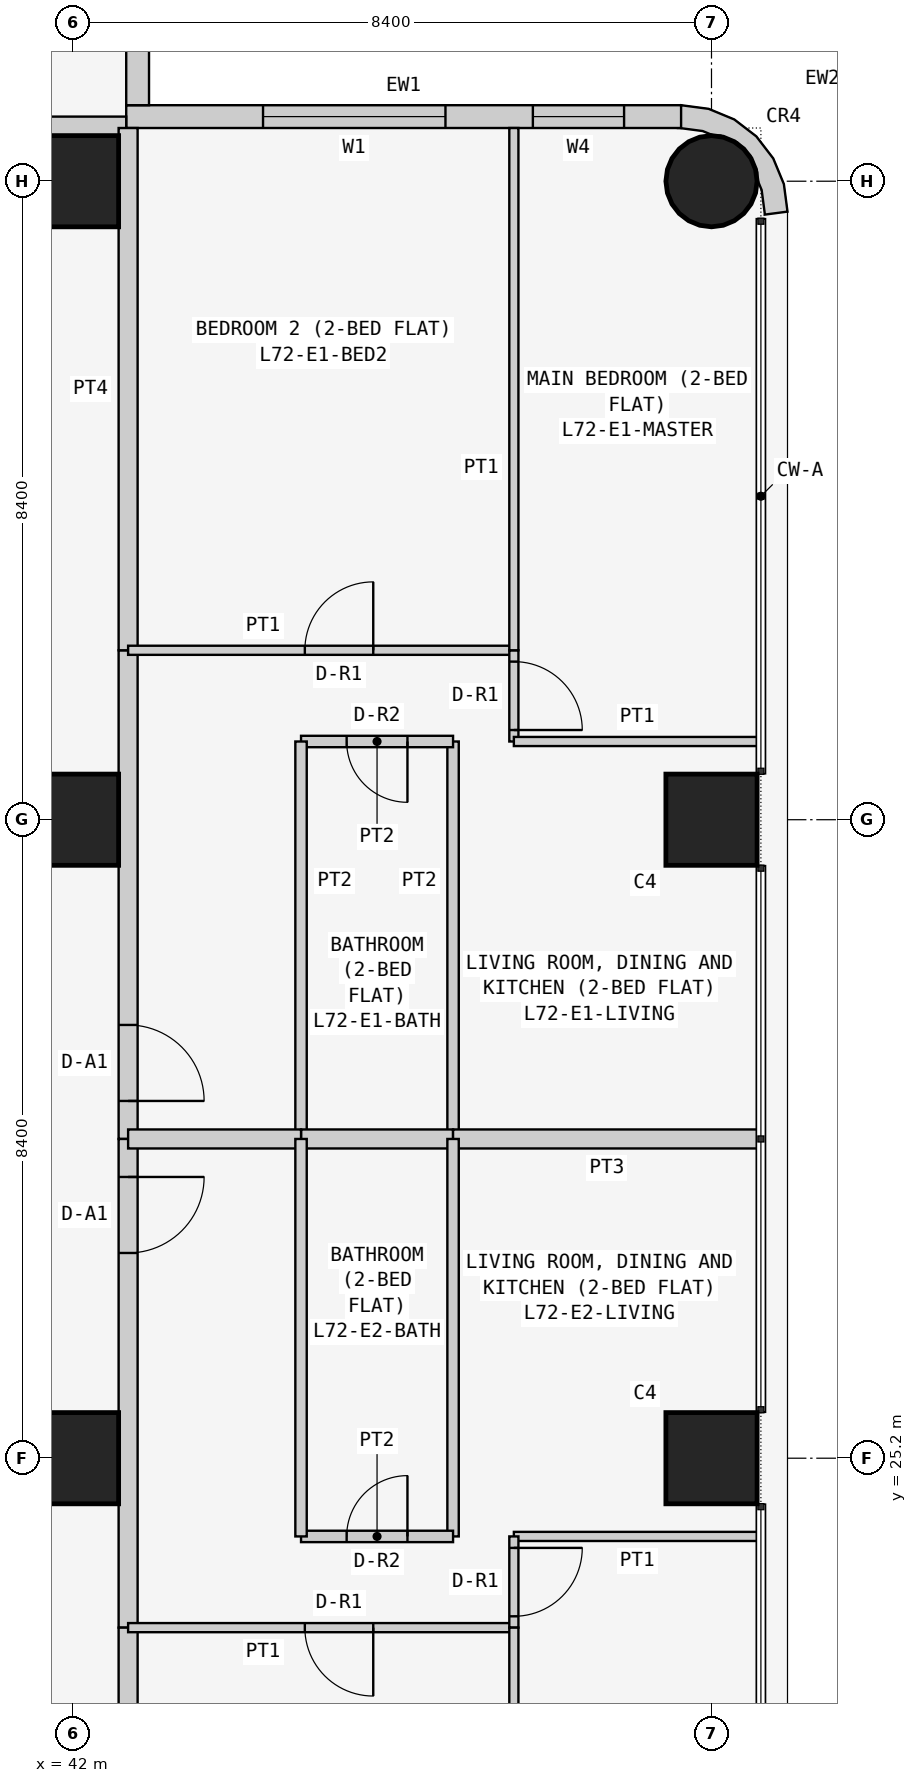
"""IFC4 building model, lengths in metres.
Left out: names, types, materials, properties, quantities, classifications, styles, units other than length and angle.
Written with IfcOpenShell. Run it as: python <this file> out.ifc"""

import sys

from ifc_helpers import new_model, si_unit, direction, frame, frame_2d, origin, origin_2d, place, context, subcontext, project, spatial, polyline, rectangle, circle, outline, extrude, element, fill, save


model = new_model("IFC4")
c1 = context("Model", 3, precision=1e-05, world=origin(), true_north=direction((0.0, 1.0)))
c2 = subcontext(c1, "Body", "Model", "MODEL_VIEW")
j1 = project(units=[si_unit("LENGTHUNIT", "METRE"), si_unit("PLANEANGLEUNIT", "RADIAN")], contexts=[c1])
p1 = place(None, origin())
s1 = spatial("IfcSite", under=j1, at=p1, CompositionType="ELEMENT")
p2 = place(p1, origin())
s2 = spatial("IfcBuilding", under=s1, at=p2, CompositionType="ELEMENT")
p3 = place(p2, frame((0.0, 0.0, 275.7)))
s3 = spatial("IfcBuildingStorey", under=s2, at=p3, CompositionType="ELEMENT", Elevation=275.7)
for number, where, z_axis, x_axis in (
    (1, (42.0, 25.2, 0.0), (0.0, 0.0, 1.0), (1.0, 0.0, 0.0)),
    (2, (42.0, 33.6, 0.0), (0.0, 0.0, 1.0), (1.0, 0.0, 0.0)),
    (3, (42.0, 42.0, 0.0), (0.0, 0.0, 1.0), (1.0, 0.0, 0.0)),
    (4, (50.4, 25.2, 0.0), (0.0, 0.0, 1.0), (1.0, 0.0, 0.0)),
    (5, (50.4, 33.6, 0.0), (0.0, 0.0, 1.0), (1.0, 0.0, 0.0)),
):
    element("IfcColumn", number, at=place(p3, frame(where, z_axis=z_axis, x_axis=x_axis)), inside=s3, PredefinedType="COLUMN", context=c2, shape_type="SweptSolid", body=[
        extrude(rectangle(XDim=1.2, YDim=1.2, at=origin_2d()), origin(), (0.0, 0.0, 1.0), 3.6),
    ])
p4 = place(p3, frame((50.4, 42.0, 0.0), z_axis=(0.0, 0.0, 1.0), x_axis=(1.0, 0.0, 0.0)))
e6 = element("IfcColumn", 6, at=p4, inside=s3, PredefinedType="COLUMN", context=c2, shape_type="SweptSolid", body=[
    extrude(circle(Radius=0.6, at=origin_2d()), origin(), (0.0, 0.0, 1.0), 3.6),
])
p5 = place(p3, frame((50.0, 42.85, 0.0), z_axis=(0.0, 0.0, 1.0), x_axis=(-1.0, 0.0, 0.0)))
e7 = element("IfcWall", 7, at=p5, inside=s3, PredefinedType="SOLIDWALL", context=c2, shape_type="SweptSolid", body=[
    extrude(rectangle(XDim=7.3, YDim=0.3, at=frame_2d((3.65, 0.0))), origin(), (0.0, 0.0, 1.0), 3.45),
])
p6 = place(p5, frame((3.1, 0.0, 0.9)))
e8 = element("IfcOpeningElement", 8, at=p6, cuts=e7, PredefinedType="OPENING", context=c2, shape_type="SweptSolid", body=[
    extrude(rectangle(XDim=2.4, YDim=1.5, at=frame_2d((1.2, 0.75))), frame((0.0, 0.16, 0.0), z_axis=(0.0, -1.0, 0.0), x_axis=(1.0, 0.0, 0.0)), (0.0, 0.0, 1.0), 0.32),
])
p7 = place(p5, frame((0.75, 0.0, 0.9)))
e9 = element("IfcOpeningElement", 9, at=p7, cuts=e7, PredefinedType="OPENING", context=c2, shape_type="SweptSolid", body=[
    extrude(rectangle(XDim=1.2, YDim=1.5, at=frame_2d((0.6, 0.75))), frame((0.0, 0.16, 0.0), z_axis=(0.0, -1.0, 0.0), x_axis=(1.0, 0.0, 0.0)), (0.0, 0.0, 1.0), 0.32),
])
p8 = place(p3, frame((42.85, 43.0, 0.0), z_axis=(0.0, 0.0, 1.0), x_axis=(0.0, 1.0, 0.0)))
e10 = element("IfcWall", 10, at=p8, inside=s3, PredefinedType="SOLIDWALL", context=c2, shape_type="SweptSolid", body=[
    extrude(rectangle(XDim=7.0, YDim=0.3, at=frame_2d((3.5, 0.0))), origin(), (0.0, 0.0, 1.0), 3.45),
])
p9 = place(p8, frame((1.5, 0.0, 0.9)))
e11 = element("IfcOpeningElement", 11, at=p9, cuts=e10, PredefinedType="OPENING", context=c2, shape_type="SweptSolid", body=[
    extrude(rectangle(XDim=2.4, YDim=1.5, at=frame_2d((1.2, 0.75))), frame((0.0, 0.16, 0.0), z_axis=(0.0, -1.0, 0.0), x_axis=(1.0, 0.0, 0.0)), (0.0, 0.0, 1.0), 0.32),
])
p10 = place(p8, frame((5.05, 0.0, 0.9)))
e12 = element("IfcOpeningElement", 12, at=p10, cuts=e10, PredefinedType="OPENING", context=c2, shape_type="SweptSolid", body=[
    extrude(rectangle(XDim=1.2, YDim=1.5, at=frame_2d((0.6, 0.75))), frame((0.0, 0.16, 0.0), z_axis=(0.0, -1.0, 0.0), x_axis=(1.0, 0.0, 0.0)), (0.0, 0.0, 1.0), 0.32),
])
p11 = place(p3, frame((50.976, 41.638, 0.0), z_axis=(0.0, 0.0, 1.0), x_axis=(0.707106781187, 0.707106781187, 0.0)))
e13 = element("IfcWall", 13, at=p11, inside=s3, PredefinedType="SOLIDWALL", context=c2, shape_type="SweptSolid", body=[
    extrude(outline(polyline([(0.233, 0.114), (0.047, -0.129), (0.033, -0.143), (0.273, -0.327), (0.495, -0.037), (0.635, 0.301), (0.683, 0.663), (0.635, 1.025), (0.495, 1.363), (0.273, 1.653), (0.033, 1.469), (0.047, 1.455), (0.233, 1.212), (0.292, 1.069), (0.358, 1.003), (0.449, 0.782), (0.449, 0.543), (0.358, 0.322), (0.292, 0.257), (0.233, 0.114)])), origin(), (0.0, 0.0, 1.0), 3.45),
])
p12 = place(p3, frame((35.829, 42.725, 0.0), z_axis=(0.0, 0.0, 1.0), x_axis=(1.0, 0.0, 0.0)))
e14 = element("IfcWall", 14, at=p12, inside=s3, PredefinedType="PARTITIONING", context=c2, shape_type="SweptSolid", body=[
    extrude(rectangle(XDim=6.871, YDim=0.25, at=frame_2d((3.436, 0.0))), origin(), (0.0, 0.0, 1.0), 3.45),
])
p13 = place(p3, frame((42.725, 35.829, 0.0), z_axis=(0.0, 0.0, 1.0), x_axis=(0.0, -1.0, 0.0)))
e15 = element("IfcWall", 15, at=p13, inside=s3, PredefinedType="PARTITIONING", context=c2, shape_type="SweptSolid", body=[
    extrude(rectangle(XDim=6.429, YDim=0.25, at=frame_2d((3.215, 0.0))), origin(), (0.0, 0.0, 1.0), 3.45),
])
p14 = place(p13, frame((4.929, 0.0, 0.0)))
e16 = element("IfcOpeningElement", 16, at=p14, cuts=e15, PredefinedType="OPENING", context=c2, shape_type="SweptSolid", body=[
    extrude(rectangle(XDim=1.0, YDim=2.1, at=frame_2d((0.5, 1.05))), frame((0.0, 0.135, 0.0), z_axis=(0.0, -1.0, 0.0), x_axis=(1.0, 0.0, 0.0)), (0.0, 0.0, 1.0), 0.27),
])
p15 = place(p3, frame((42.725, 42.7, 0.0), z_axis=(0.0, 0.0, 1.0), x_axis=(0.0, -1.0, 0.0)))
e17 = element("IfcWall", 17, at=p15, inside=s3, PredefinedType="PARTITIONING", context=c2, shape_type="SweptSolid", body=[
    extrude(rectangle(XDim=6.871, YDim=0.25, at=frame_2d((3.436, 0.0))), origin(), (0.0, 0.0, 1.0), 3.45),
])
p16 = place(p3, frame((42.725, 29.4, 0.0), z_axis=(0.0, 0.0, 1.0), x_axis=(0.0, -1.0, 0.0)))
e18 = element("IfcWall", 18, at=p16, inside=s3, PredefinedType="PARTITIONING", context=c2, shape_type="SweptSolid", body=[
    extrude(rectangle(XDim=6.429, YDim=0.25, at=frame_2d((3.214, 0.0))), origin(), (0.0, 0.0, 1.0), 3.45),
])
p17 = place(p16, frame((0.5, 0.0, 0.0)))
e19 = element("IfcOpeningElement", 19, at=p17, cuts=e18, PredefinedType="OPENING", context=c2, shape_type="SweptSolid", body=[
    extrude(rectangle(XDim=1.0, YDim=2.1, at=frame_2d((0.5, 1.05))), frame((0.0, 0.135, 0.0), z_axis=(0.0, -1.0, 0.0), x_axis=(1.0, 0.0, 0.0)), (0.0, 0.0, 1.0), 0.27),
])
p18 = place(p3, frame((42.725, 22.971, 0.0), z_axis=(0.0, 0.0, 1.0), x_axis=(0.0, -1.0, 0.0)))
e20 = element("IfcWall", 20, at=p18, inside=s3, PredefinedType="PARTITIONING", context=c2, shape_type="SweptSolid", body=[
    extrude(rectangle(XDim=6.871, YDim=0.25, at=frame_2d((3.436, 0.0))), origin(), (0.0, 0.0, 1.0), 3.45),
])
p19 = place(p3, frame((47.0, 29.4, 0.0), z_axis=(0.0, 0.0, 1.0), x_axis=(0.0, 1.0, 0.0)))
e21 = element("IfcWall", 21, at=p19, inside=s3, PredefinedType="PARTITIONING", context=c2, shape_type="SweptSolid", body=[
    extrude(rectangle(XDim=5.229, YDim=0.15, at=frame_2d((2.615, 0.0))), origin(), (0.0, 0.0, 1.0), 3.45),
])
p20 = place(p3, frame((47.0, 34.629, 0.0), z_axis=(0.0, 0.0, 1.0), x_axis=(-1.0, 0.0, 0.0)))
e22 = element("IfcWall", 22, at=p20, inside=s3, PredefinedType="PARTITIONING", context=c2, shape_type="SweptSolid", body=[
    extrude(rectangle(XDim=2.0, YDim=0.15, at=frame_2d((1.0, 0.0))), origin(), (0.0, 0.0, 1.0), 3.45),
])
p21 = place(p20, frame((0.6, 0.0, 0.0)))
e23 = element("IfcOpeningElement", 23, at=p21, cuts=e22, PredefinedType="OPENING", context=c2, shape_type="SweptSolid", body=[
    extrude(rectangle(XDim=0.8, YDim=2.1, at=frame_2d((0.4, 1.05))), frame((0.0, 0.085, 0.0), z_axis=(0.0, -1.0, 0.0), x_axis=(1.0, 0.0, 0.0)), (0.0, 0.0, 1.0), 0.17),
])
p22 = place(p3, frame((45.0, 34.629, 0.0), z_axis=(0.0, 0.0, 1.0), x_axis=(0.0, -1.0, 0.0)))
e24 = element("IfcWall", 24, at=p22, inside=s3, PredefinedType="PARTITIONING", context=c2, shape_type="SweptSolid", body=[
    extrude(rectangle(XDim=5.229, YDim=0.15, at=frame_2d((2.615, 0.0))), origin(), (0.0, 0.0, 1.0), 3.45),
])
p23 = place(p3, frame((45.0, 29.4, 0.0), z_axis=(0.0, 0.0, 1.0), x_axis=(1.0, 0.0, 0.0)))
e25 = element("IfcWall", 25, at=p23, inside=s3, PredefinedType="PARTITIONING", context=c2, shape_type="SweptSolid", body=[
    extrude(rectangle(XDim=2.0, YDim=0.25, at=frame_2d((1.0, 0.0))), origin(), (0.0, 0.0, 1.0), 3.45),
])
p24 = place(p3, frame((42.725, 35.829, 0.0), z_axis=(0.0, 0.0, 1.0), x_axis=(1.0, 0.0, 0.0)))
e26 = element("IfcWall", 26, at=p24, inside=s3, PredefinedType="PARTITIONING", context=c2, shape_type="SweptSolid", body=[
    extrude(rectangle(XDim=5.075, YDim=0.12, at=frame_2d((2.538, 0.0))), origin(), (0.0, 0.0, 1.0), 3.45),
])
p25 = place(p24, frame((2.325, 0.0, 0.0)))
e27 = element("IfcOpeningElement", 27, at=p25, cuts=e26, PredefinedType="OPENING", context=c2, shape_type="SweptSolid", body=[
    extrude(rectangle(XDim=0.9, YDim=2.1, at=frame_2d((0.45, 1.05))), frame((0.0, 0.07, 0.0), z_axis=(0.0, -1.0, 0.0), x_axis=(1.0, 0.0, 0.0)), (0.0, 0.0, 1.0), 0.14),
])
p26 = place(p3, frame((47.8, 35.829, 0.0), z_axis=(0.0, 0.0, 1.0), x_axis=(0.0, -1.0, 0.0)))
e28 = element("IfcWall", 28, at=p26, inside=s3, PredefinedType="PARTITIONING", context=c2, shape_type="SweptSolid", body=[
    extrude(rectangle(XDim=1.2, YDim=0.12, at=frame_2d((0.6, 0.0))), origin(), (0.0, 0.0, 1.0), 3.45),
])
p27 = place(p26, frame((0.149, 0.0, 0.0)))
e29 = element("IfcOpeningElement", 29, at=p27, cuts=e28, PredefinedType="OPENING", context=c2, shape_type="SweptSolid", body=[
    extrude(rectangle(XDim=0.9, YDim=2.1, at=frame_2d((0.45, 1.05))), frame((0.0, 0.07, 0.0), z_axis=(0.0, -1.0, 0.0), x_axis=(1.0, 0.0, 0.0)), (0.0, 0.0, 1.0), 0.14),
])
p28 = place(p3, frame((47.8, 34.629, 0.0), z_axis=(0.0, 0.0, 1.0), x_axis=(1.0, 0.0, 0.0)))
e30 = element("IfcWall", 30, at=p28, inside=s3, PredefinedType="PARTITIONING", context=c2, shape_type="SweptSolid", body=[
    extrude(rectangle(XDim=3.25, YDim=0.12, at=frame_2d((1.625, 0.0))), origin(), (0.0, 0.0, 1.0), 3.45),
])
p29 = place(p3, frame((45.0, 29.4, 0.0), z_axis=(0.0, 0.0, 1.0), x_axis=(-1.0, 0.0, 0.0)))
e31 = element("IfcWall", 31, at=p29, inside=s3, PredefinedType="PARTITIONING", context=c2, shape_type="SweptSolid", body=[
    extrude(rectangle(XDim=2.275, YDim=0.25, at=frame_2d((1.137, 0.0))), origin(), (0.0, 0.0, 1.0), 3.45),
])
p30 = place(p3, frame((51.05, 29.4, 0.0), z_axis=(0.0, 0.0, 1.0), x_axis=(-1.0, 0.0, 0.0)))
e32 = element("IfcWall", 32, at=p30, inside=s3, PredefinedType="PARTITIONING", context=c2, shape_type="SweptSolid", body=[
    extrude(rectangle(XDim=4.05, YDim=0.25, at=frame_2d((2.025, 0.0))), origin(), (0.0, 0.0, 1.0), 3.45),
])
p31 = place(p3, frame((47.8, 35.829, 0.0), z_axis=(0.0, 0.0, 1.0), x_axis=(0.0, 1.0, 0.0)))
e33 = element("IfcWall", 33, at=p31, inside=s3, PredefinedType="PARTITIONING", context=c2, shape_type="SweptSolid", body=[
    extrude(rectangle(XDim=6.871, YDim=0.12, at=frame_2d((3.436, 0.0))), origin(), (0.0, 0.0, 1.0), 3.45),
])
p32 = place(p3, frame((47.0, 29.4, 0.0), z_axis=(0.0, 0.0, 1.0), x_axis=(0.0, -1.0, 0.0)))
e34 = element("IfcWall", 34, at=p32, inside=s3, PredefinedType="PARTITIONING", context=c2, shape_type="SweptSolid", body=[
    extrude(rectangle(XDim=5.229, YDim=0.15, at=frame_2d((2.615, 0.0))), origin(), (0.0, 0.0, 1.0), 3.45),
])
p33 = place(p3, frame((47.0, 24.171, 0.0), z_axis=(0.0, 0.0, 1.0), x_axis=(-1.0, 0.0, 0.0)))
e35 = element("IfcWall", 35, at=p33, inside=s3, PredefinedType="PARTITIONING", context=c2, shape_type="SweptSolid", body=[
    extrude(rectangle(XDim=2.0, YDim=0.15, at=frame_2d((1.0, 0.0))), origin(), (0.0, 0.0, 1.0), 3.45),
])
p34 = place(p33, frame((0.6, 0.0, 0.0)))
e36 = element("IfcOpeningElement", 36, at=p34, cuts=e35, PredefinedType="OPENING", context=c2, shape_type="SweptSolid", body=[
    extrude(rectangle(XDim=0.8, YDim=2.1, at=frame_2d((0.4, 1.05))), frame((0.0, 0.085, 0.0), z_axis=(0.0, -1.0, 0.0), x_axis=(1.0, 0.0, 0.0)), (0.0, 0.0, 1.0), 0.17),
])
p35 = place(p3, frame((45.0, 24.171, 0.0), z_axis=(0.0, 0.0, 1.0), x_axis=(0.0, 1.0, 0.0)))
e37 = element("IfcWall", 37, at=p35, inside=s3, PredefinedType="PARTITIONING", context=c2, shape_type="SweptSolid", body=[
    extrude(rectangle(XDim=5.229, YDim=0.15, at=frame_2d((2.615, 0.0))), origin(), (0.0, 0.0, 1.0), 3.45),
])
p36 = place(p3, frame((47.8, 22.971, 0.0), z_axis=(0.0, 0.0, 1.0), x_axis=(-1.0, 0.0, 0.0)))
e38 = element("IfcWall", 38, at=p36, inside=s3, PredefinedType="PARTITIONING", context=c2, shape_type="SweptSolid", body=[
    extrude(rectangle(XDim=5.075, YDim=0.12, at=frame_2d((2.538, 0.0))), origin(), (0.0, 0.0, 1.0), 3.45),
])
p37 = place(p36, frame((1.85, 0.0, 0.0)))
e39 = element("IfcOpeningElement", 39, at=p37, cuts=e38, PredefinedType="OPENING", context=c2, shape_type="SweptSolid", body=[
    extrude(rectangle(XDim=0.9, YDim=2.1, at=frame_2d((0.45, 1.05))), frame((0.0, 0.07, 0.0), z_axis=(0.0, -1.0, 0.0), x_axis=(1.0, 0.0, 0.0)), (0.0, 0.0, 1.0), 0.14),
])
p38 = place(p3, frame((51.05, 24.171, 0.0), z_axis=(0.0, 0.0, 1.0), x_axis=(-1.0, 0.0, 0.0)))
e40 = element("IfcWall", 40, at=p38, inside=s3, PredefinedType="PARTITIONING", context=c2, shape_type="SweptSolid", body=[
    extrude(rectangle(XDim=3.25, YDim=0.12, at=frame_2d((1.625, 0.0))), origin(), (0.0, 0.0, 1.0), 3.45),
])
p39 = place(p3, frame((47.8, 24.171, 0.0), z_axis=(0.0, 0.0, 1.0), x_axis=(0.0, -1.0, 0.0)))
e41 = element("IfcWall", 41, at=p39, inside=s3, PredefinedType="PARTITIONING", context=c2, shape_type="SweptSolid", body=[
    extrude(rectangle(XDim=1.2, YDim=0.12, at=frame_2d((0.6, 0.0))), origin(), (0.0, 0.0, 1.0), 3.45),
])
p40 = place(p39, frame((0.151, 0.0, 0.0)))
e42 = element("IfcOpeningElement", 42, at=p40, cuts=e41, PredefinedType="OPENING", context=c2, shape_type="SweptSolid", body=[
    extrude(rectangle(XDim=0.9, YDim=2.1, at=frame_2d((0.45, 1.05))), frame((0.0, 0.07, 0.0), z_axis=(0.0, -1.0, 0.0), x_axis=(1.0, 0.0, 0.0)), (0.0, 0.0, 1.0), 0.14),
])
p41 = place(p3, frame((47.8, 22.971, 0.0), z_axis=(0.0, 0.0, 1.0), x_axis=(0.0, -1.0, 0.0)))
e43 = element("IfcWall", 43, at=p41, inside=s3, PredefinedType="PARTITIONING", context=c2, shape_type="SweptSolid", body=[
    extrude(rectangle(XDim=6.871, YDim=0.12, at=frame_2d((3.436, 0.0))), origin(), (0.0, 0.0, 1.0), 3.45),
])
p42 = place(p6, origin())
e44 = element("IfcWindow", 44, at=p42, inside=s3, PartitioningType="SINGLE_PANEL", PredefinedType="WINDOW", context=c2, shape_type="SweptSolid", body=[
    extrude(rectangle(XDim=2.4, YDim=1.5, at=frame_2d((1.2, 0.75))), frame((0.0, 0.03, 0.0), z_axis=(0.0, -1.0, 0.0), x_axis=(1.0, 0.0, 0.0)), (0.0, 0.0, 1.0), 0.06),
])
fill(e8, e44)
p43 = place(p7, origin())
e45 = element("IfcWindow", 45, at=p43, inside=s3, PartitioningType="SINGLE_PANEL", PredefinedType="WINDOW", context=c2, shape_type="SweptSolid", body=[
    extrude(rectangle(XDim=1.2, YDim=1.5, at=frame_2d((0.6, 0.75))), frame((0.0, 0.03, 0.0), z_axis=(0.0, -1.0, 0.0), x_axis=(1.0, 0.0, 0.0)), (0.0, 0.0, 1.0), 0.06),
])
fill(e9, e45)
p44 = place(p14, origin())
e46 = element("IfcDoor", 46, at=p44, inside=s3, OperationType="SINGLE_SWING_RIGHT", PredefinedType="DOOR", context=c2, shape_type="SweptSolid", body=[
    extrude(rectangle(XDim=1.0, YDim=2.1, at=frame_2d((0.5, 1.05))), frame((0.0, 0.025, 0.0), z_axis=(0.0, -1.0, 0.0), x_axis=(1.0, 0.0, 0.0)), (0.0, 0.0, 1.0), 0.05),
])
fill(e16, e46)
p45 = place(p21, origin())
e47 = element("IfcDoor", 47, at=p45, inside=s3, OperationType="SINGLE_SWING_LEFT", PredefinedType="DOOR", context=c2, shape_type="SweptSolid", body=[
    extrude(rectangle(XDim=0.8, YDim=2.1, at=frame_2d((0.4, 1.05))), frame((0.0, 0.025, 0.0), z_axis=(0.0, -1.0, 0.0), x_axis=(1.0, 0.0, 0.0)), (0.0, 0.0, 1.0), 0.05),
])
fill(e23, e47)
p46 = place(p25, origin())
e48 = element("IfcDoor", 48, at=p46, inside=s3, OperationType="SINGLE_SWING_RIGHT", PredefinedType="DOOR", context=c2, shape_type="SweptSolid", body=[
    extrude(rectangle(XDim=0.9, YDim=2.1, at=frame_2d((0.45, 1.05))), frame((0.0, 0.025, 0.0), z_axis=(0.0, -1.0, 0.0), x_axis=(1.0, 0.0, 0.0)), (0.0, 0.0, 1.0), 0.05),
])
fill(e27, e48)
p47 = place(p27, origin())
e49 = element("IfcDoor", 49, at=p47, inside=s3, OperationType="SINGLE_SWING_RIGHT", PredefinedType="DOOR", context=c2, shape_type="SweptSolid", body=[
    extrude(rectangle(XDim=0.9, YDim=2.1, at=frame_2d((0.45, 1.05))), frame((0.0, 0.025, 0.0), z_axis=(0.0, -1.0, 0.0), x_axis=(1.0, 0.0, 0.0)), (0.0, 0.0, 1.0), 0.05),
])
fill(e29, e49)
p48 = place(p17, origin())
e50 = element("IfcDoor", 50, at=p48, inside=s3, OperationType="SINGLE_SWING_LEFT", PredefinedType="DOOR", context=c2, shape_type="SweptSolid", body=[
    extrude(rectangle(XDim=1.0, YDim=2.1, at=frame_2d((0.5, 1.05))), frame((0.0, 0.025, 0.0), z_axis=(0.0, -1.0, 0.0), x_axis=(1.0, 0.0, 0.0)), (0.0, 0.0, 1.0), 0.05),
])
fill(e19, e50)
p49 = place(p34, frame((0.8, 0.0, 0.0), z_axis=(0.0, 0.0, 1.0), x_axis=(-1.0, 0.0, 0.0)))
e51 = element("IfcDoor", 51, at=p49, inside=s3, OperationType="SINGLE_SWING_RIGHT", PredefinedType="DOOR", context=c2, shape_type="SweptSolid", body=[
    extrude(rectangle(XDim=0.8, YDim=2.1, at=frame_2d((0.4, 1.05))), frame((0.0, 0.025, 0.0), z_axis=(0.0, -1.0, 0.0), x_axis=(1.0, 0.0, 0.0)), (0.0, 0.0, 1.0), 0.05),
])
fill(e36, e51)
p50 = place(p37, origin())
e52 = element("IfcDoor", 52, at=p50, inside=s3, OperationType="SINGLE_SWING_LEFT", PredefinedType="DOOR", context=c2, shape_type="SweptSolid", body=[
    extrude(rectangle(XDim=0.9, YDim=2.1, at=frame_2d((0.45, 1.05))), frame((0.0, 0.025, 0.0), z_axis=(0.0, -1.0, 0.0), x_axis=(1.0, 0.0, 0.0)), (0.0, 0.0, 1.0), 0.05),
])
fill(e39, e52)
p51 = place(p40, origin())
e53 = element("IfcDoor", 53, at=p51, inside=s3, OperationType="SINGLE_SWING_LEFT", PredefinedType="DOOR", context=c2, shape_type="SweptSolid", body=[
    extrude(rectangle(XDim=0.9, YDim=2.1, at=frame_2d((0.45, 1.05))), frame((0.0, 0.025, 0.0), z_axis=(0.0, -1.0, 0.0), x_axis=(1.0, 0.0, 0.0)), (0.0, 0.0, 1.0), 0.05),
])
fill(e42, e53)
save(model, sys.argv[1])
